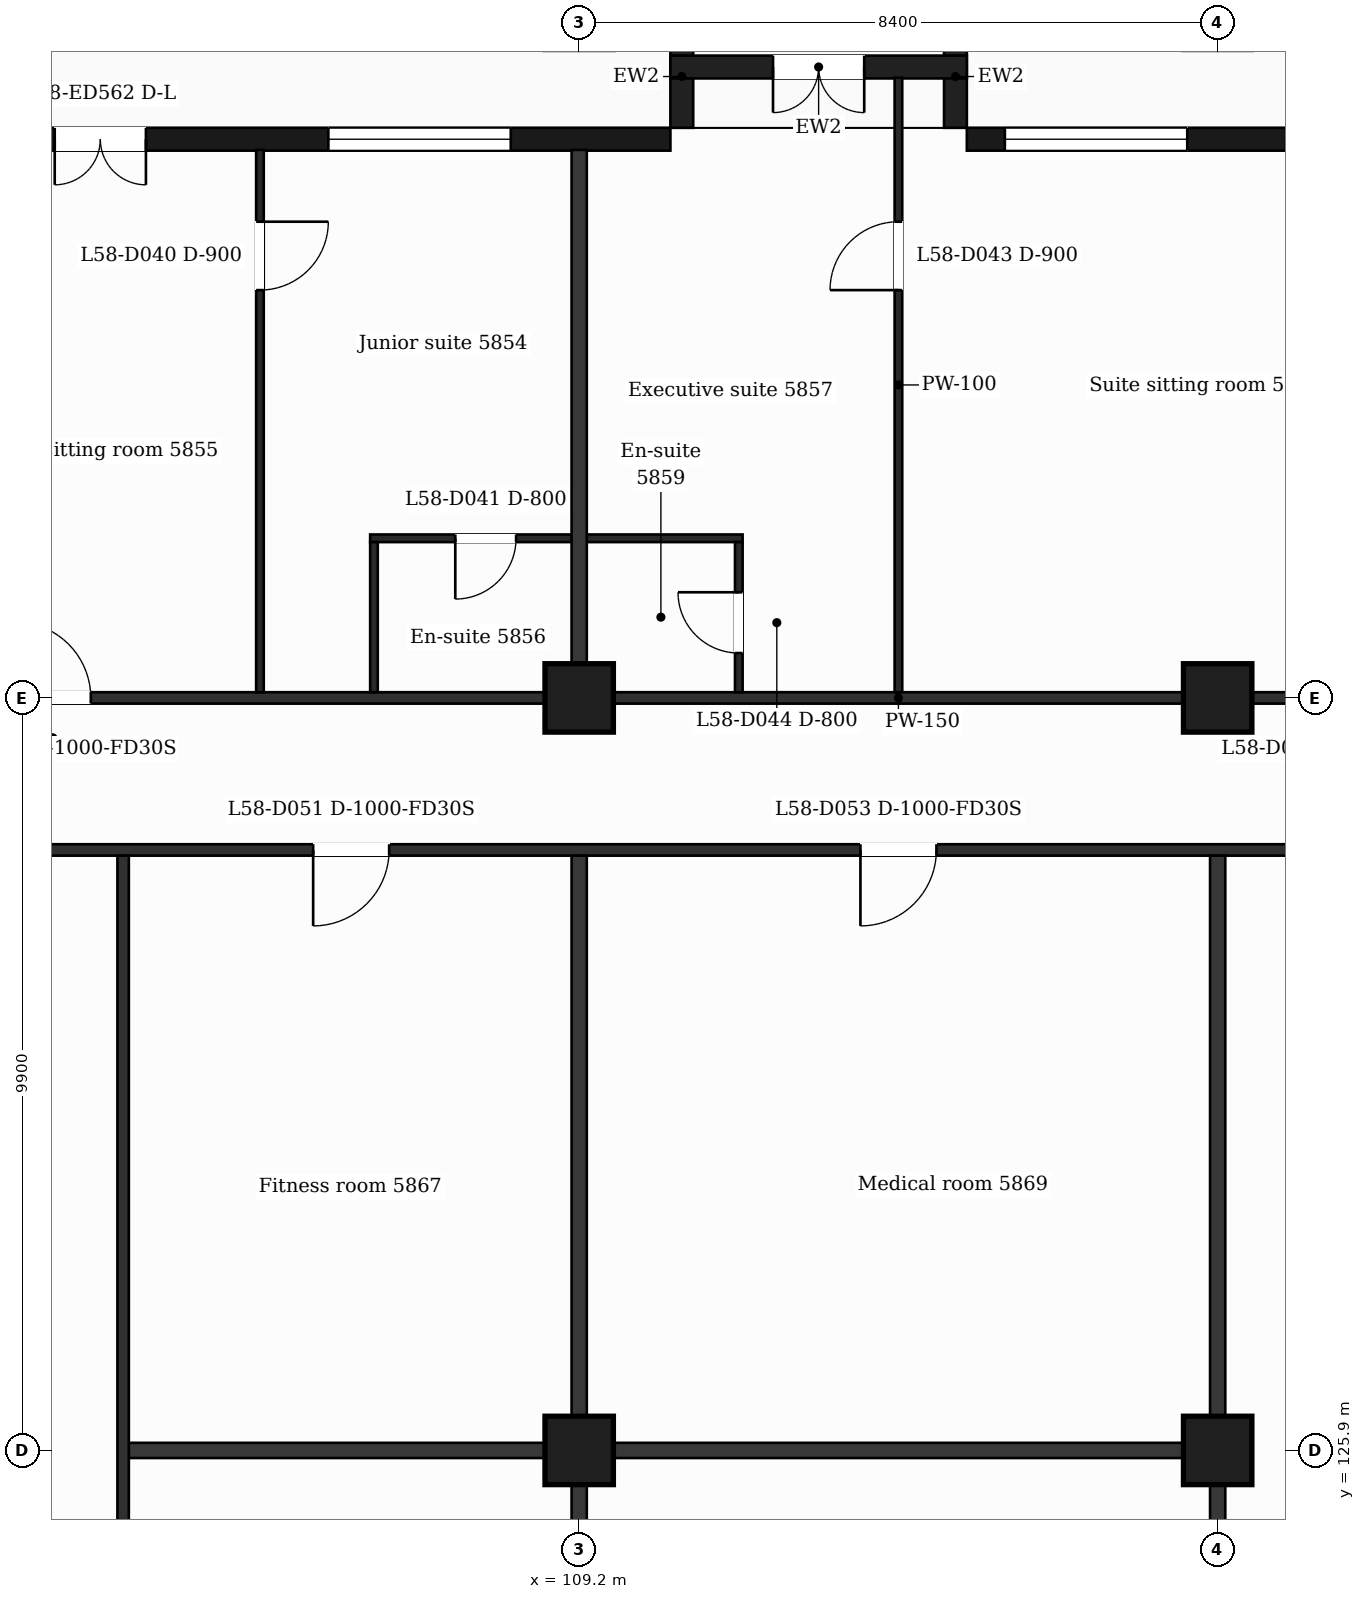
"""IFC4 building model, lengths in metres.
Left out: names, types, materials, properties, quantities, classifications, styles, units other than length and angle.
Written with IfcOpenShell. Run it as: python <this file> out.ifc"""

import sys

from ifc_helpers import new_model, si_unit, direction, frame, frame_2d, origin, origin_2d, place, context, subcontext, project, spatial, rectangle, extrude, element, fill, save


model = new_model("IFC4")
c1 = context("Model", 3, precision=1e-05, world=origin(), true_north=direction((0.0, 1.0)))
c2 = subcontext(c1, "Body", "Model", "MODEL_VIEW")
j1 = project(units=[si_unit("LENGTHUNIT", "METRE"), si_unit("PLANEANGLEUNIT", "RADIAN")], contexts=[c1])
p1 = place(None, origin())
s1 = spatial("IfcSite", under=j1, at=p1, CompositionType="ELEMENT")
p2 = place(p1, origin())
s2 = spatial("IfcBuilding", under=s1, at=p2, CompositionType="ELEMENT")
p3 = place(p2, frame((0.0, 0.0, 239.2)))
s3 = spatial("IfcBuildingStorey", under=s2, at=p3, CompositionType="ELEMENT", Elevation=239.2)
for number, where, z_axis, x_axis in (
    (1, (109.2, 125.9, 0.0), (0.0, 0.0, 1.0), (1.0, 0.0, 0.0)),
    (2, (117.6, 125.9, 0.0), (0.0, 0.0, 1.0), (1.0, 0.0, 0.0)),
    (3, (109.2, 135.8, 0.0), (0.0, 0.0, 1.0), (1.0, 0.0, 0.0)),
    (4, (117.6, 135.8, 0.0), (0.0, 0.0, 1.0), (1.0, 0.0, 0.0)),
):
    element("IfcColumn", number, at=place(p3, frame(where, z_axis=z_axis, x_axis=x_axis)), inside=s3, PredefinedType="COLUMN", context=c2, shape_type="SweptSolid", body=[
        extrude(rectangle(XDim=0.9, YDim=0.9, at=origin_2d()), origin(), (0.0, 0.0, 1.0), 3.7),
    ])
p4 = place(p3, frame((130.65, 143.15, 0.0), z_axis=(0.0, 0.0, 1.0), x_axis=(-1.0, 0.0, 0.0)))
e5 = element("IfcWall", 5, at=p4, inside=s3, PredefinedType="SOLIDWALL", context=c2, shape_type="SweptSolid", body=[
    extrude(rectangle(XDim=16.35, YDim=0.3, at=frame_2d((8.175, 0.0))), origin(), (0.0, 0.0, 1.0), 3.38),
])
p5 = place(p4, frame((1.95, 0.0, 0.9)))
e6 = element("IfcOpeningElement", 6, at=p5, cuts=e5, PredefinedType="OPENING", context=c2, shape_type="SweptSolid", body=[
    extrude(rectangle(XDim=1.2, YDim=2.1, at=frame_2d((0.6, 1.05))), frame((0.0, 0.16, 0.0), z_axis=(0.0, -1.0, 0.0), x_axis=(1.0, 0.0, 0.0)), (0.0, 0.0, 1.0), 0.32),
])
p6 = place(p4, frame((6.15, 0.0, 0.0)))
e7 = element("IfcOpeningElement", 7, at=p6, cuts=e5, PredefinedType="OPENING", context=c2, shape_type="SweptSolid", body=[
    extrude(rectangle(XDim=1.2, YDim=2.4, at=frame_2d((0.6, 1.2))), frame((0.0, 0.16, 0.0), z_axis=(0.0, -1.0, 0.0), x_axis=(1.0, 0.0, 0.0)), (0.0, 0.0, 1.0), 0.32),
])
p7 = place(p4, frame((9.75, 0.0, 0.9)))
e8 = element("IfcOpeningElement", 8, at=p7, cuts=e5, PredefinedType="OPENING", context=c2, shape_type="SweptSolid", body=[
    extrude(rectangle(XDim=2.4, YDim=2.1, at=frame_2d((1.2, 1.05))), frame((0.0, 0.16, 0.0), z_axis=(0.0, -1.0, 0.0), x_axis=(1.0, 0.0, 0.0)), (0.0, 0.0, 1.0), 0.32),
])
p8 = place(p4, frame((13.45, 0.0, 0.9)))
e9 = element("IfcOpeningElement", 9, at=p8, cuts=e5, PredefinedType="OPENING", context=c2, shape_type="SweptSolid", body=[
    extrude(rectangle(XDim=2.4, YDim=2.1, at=frame_2d((1.2, 1.05))), frame((0.0, 0.16, 0.0), z_axis=(0.0, -1.0, 0.0), x_axis=(1.0, 0.0, 0.0)), (0.0, 0.0, 1.0), 0.32),
])
p9 = place(p3, frame((110.4, 143.15, 0.0), z_axis=(0.0, 0.0, 1.0), x_axis=(-1.0, 0.0, 0.0)))
e10 = element("IfcWall", 10, at=p9, inside=s3, PredefinedType="SOLIDWALL", context=c2, shape_type="SweptSolid", body=[
    extrude(rectangle(XDim=14.4, YDim=0.3, at=frame_2d((7.2, 0.0))), origin(), (0.0, 0.0, 1.0), 3.38),
])
p10 = place(p9, frame((2.1, 0.0, 0.9)))
e11 = element("IfcOpeningElement", 11, at=p10, cuts=e10, PredefinedType="OPENING", context=c2, shape_type="SweptSolid", body=[
    extrude(rectangle(XDim=2.4, YDim=2.1, at=frame_2d((1.2, 1.05))), frame((0.0, 0.16, 0.0), z_axis=(0.0, -1.0, 0.0), x_axis=(1.0, 0.0, 0.0)), (0.0, 0.0, 1.0), 0.32),
])
p11 = place(p9, frame((6.9, 0.0, 0.0)))
e12 = element("IfcOpeningElement", 12, at=p11, cuts=e10, PredefinedType="OPENING", context=c2, shape_type="SweptSolid", body=[
    extrude(rectangle(XDim=1.2, YDim=2.4, at=frame_2d((0.6, 1.2))), frame((0.0, 0.16, 0.0), z_axis=(0.0, -1.0, 0.0), x_axis=(1.0, 0.0, 0.0)), (0.0, 0.0, 1.0), 0.32),
])
p12 = place(p9, frame((11.1, 0.0, 0.9)))
e13 = element("IfcOpeningElement", 13, at=p12, cuts=e10, PredefinedType="OPENING", context=c2, shape_type="SweptSolid", body=[
    extrude(rectangle(XDim=1.2, YDim=2.1, at=frame_2d((0.6, 1.05))), frame((0.0, 0.16, 0.0), z_axis=(0.0, -1.0, 0.0), x_axis=(1.0, 0.0, 0.0)), (0.0, 0.0, 1.0), 0.32),
])
for number, where, z_axis, x_axis in (
    (14, (114.15, 143.3, 0.0), (0.0, 0.0, 1.0), (0.0, 1.0, 0.0)),
    (15, (110.55, 143.3, 0.0), (0.0, 0.0, 1.0), (0.0, 1.0, 0.0)),
):
    element("IfcWall", number, at=place(p3, frame(where, z_axis=z_axis, x_axis=x_axis)), inside=s3, PredefinedType="SOLIDWALL", context=c2, shape_type="SweptSolid", body=[
        extrude(rectangle(XDim=1.35, YDim=0.3, at=frame_2d((0.675, 0.0))), origin(), (0.0, 0.0, 1.0), 3.38),
    ])
p13 = place(p3, frame((114.3, 144.1, 0.0), z_axis=(0.0, 0.0, 1.0), x_axis=(-1.0, 0.0, 0.0)))
e16 = element("IfcWall", 16, at=p13, inside=s3, PredefinedType="SOLIDWALL", context=c2, shape_type="SweptSolid", body=[
    extrude(rectangle(XDim=3.9, YDim=0.3, at=frame_2d((1.95, 0.0))), origin(), (0.0, 0.0, 1.0), 3.38),
])
p14 = place(p13, frame((1.35, 0.0, 0.0)))
e17 = element("IfcOpeningElement", 17, at=p14, cuts=e16, PredefinedType="OPENING", context=c2, shape_type="SweptSolid", body=[
    extrude(rectangle(XDim=1.2, YDim=2.4, at=frame_2d((0.6, 1.2))), frame((0.0, 0.16, 0.0), z_axis=(0.0, -1.0, 0.0), x_axis=(1.0, 0.0, 0.0)), (0.0, 0.0, 1.0), 0.32),
])
p15 = place(p3, frame((103.2, 125.9, 0.0), z_axis=(0.0, 0.0, 1.0), x_axis=(1.0, 0.0, 0.0)))
e18 = element("IfcWall", 18, at=p15, inside=s3, PredefinedType="PARTITIONING", context=c2, shape_type="SweptSolid", body=[
    extrude(rectangle(XDim=14.4, YDim=0.2, at=frame_2d((7.2, 0.0))), origin(), (0.0, 0.0, 1.0), 3.38),
])
p16 = place(p3, frame((100.725, 133.8, 0.0), z_axis=(0.0, 0.0, 1.0), x_axis=(1.0, 0.0, 0.0)))
e19 = element("IfcWall", 19, at=p16, inside=s3, PredefinedType="PARTITIONING", context=c2, shape_type="SweptSolid", body=[
    extrude(rectangle(XDim=25.35, YDim=0.15, at=frame_2d((12.675, 0.0))), origin(), (0.0, 0.0, 1.0), 3.38),
])
p17 = place(p16, frame((4.975, 0.0, 0.0)))
e20 = element("IfcOpeningElement", 20, at=p17, cuts=e19, PredefinedType="OPENING", context=c2, shape_type="SweptSolid", body=[
    extrude(rectangle(XDim=1.0, YDim=2.1, at=frame_2d((0.5, 1.05))), frame((0.0, 0.085, 0.0), z_axis=(0.0, -1.0, 0.0), x_axis=(1.0, 0.0, 0.0)), (0.0, 0.0, 1.0), 0.17),
])
p18 = place(p16, frame((12.175, 0.0, 0.0)))
e21 = element("IfcOpeningElement", 21, at=p18, cuts=e19, PredefinedType="OPENING", context=c2, shape_type="SweptSolid", body=[
    extrude(rectangle(XDim=1.0, YDim=2.1, at=frame_2d((0.5, 1.05))), frame((0.0, 0.085, 0.0), z_axis=(0.0, -1.0, 0.0), x_axis=(1.0, 0.0, 0.0)), (0.0, 0.0, 1.0), 0.17),
])
p19 = place(p16, frame((20.45, 0.0, 0.0)))
e22 = element("IfcOpeningElement", 22, at=p19, cuts=e19, PredefinedType="OPENING", context=c2, shape_type="SweptSolid", body=[
    extrude(rectangle(XDim=1.0, YDim=2.1, at=frame_2d((0.5, 1.05))), frame((0.0, 0.085, 0.0), z_axis=(0.0, -1.0, 0.0), x_axis=(1.0, 0.0, 0.0)), (0.0, 0.0, 1.0), 0.17),
])
p20 = place(p3, frame((90.895, 135.8, 0.0), z_axis=(0.0, 0.0, 1.0), x_axis=(1.0, 0.0, 0.0)))
e23 = element("IfcWall", 23, at=p20, inside=s3, PredefinedType="PARTITIONING", context=c2, shape_type="SweptSolid", body=[
    extrude(rectangle(XDim=45.011, YDim=0.15, at=frame_2d((22.505, 0.0))), origin(), (0.0, 0.0, 1.0), 3.38),
])
p21 = place(p20, frame((7.455, 0.0, 0.0)))
e24 = element("IfcOpeningElement", 24, at=p21, cuts=e23, PredefinedType="OPENING", context=c2, shape_type="SweptSolid", body=[
    extrude(rectangle(XDim=1.0, YDim=2.1, at=frame_2d((0.5, 1.05))), frame((0.0, 0.085, 0.0), z_axis=(0.0, -1.0, 0.0), x_axis=(1.0, 0.0, 0.0)), (0.0, 0.0, 1.0), 0.17),
])
p22 = place(p20, frame((10.88, 0.0, 0.0)))
e25 = element("IfcOpeningElement", 25, at=p22, cuts=e23, PredefinedType="OPENING", context=c2, shape_type="SweptSolid", body=[
    extrude(rectangle(XDim=1.0, YDim=2.1, at=frame_2d((0.5, 1.05))), frame((0.0, 0.085, 0.0), z_axis=(0.0, -1.0, 0.0), x_axis=(1.0, 0.0, 0.0)), (0.0, 0.0, 1.0), 0.17),
])
p23 = place(p20, frame((27.88, 0.0, 0.0)))
e26 = element("IfcOpeningElement", 26, at=p23, cuts=e23, PredefinedType="OPENING", context=c2, shape_type="SweptSolid", body=[
    extrude(rectangle(XDim=1.0, YDim=2.1, at=frame_2d((0.5, 1.05))), frame((0.0, 0.085, 0.0), z_axis=(0.0, -1.0, 0.0), x_axis=(1.0, 0.0, 0.0)), (0.0, 0.0, 1.0), 0.17),
])
p24 = place(p20, frame((33.168, 0.0, 0.0)))
e27 = element("IfcOpeningElement", 27, at=p24, cuts=e23, PredefinedType="OPENING", context=c2, shape_type="SweptSolid", body=[
    extrude(rectangle(XDim=0.95, YDim=2.1, at=frame_2d((0.475, 1.05))), frame((0.0, 0.085, 0.0), z_axis=(0.0, -1.0, 0.0), x_axis=(1.0, 0.0, 0.0)), (0.0, 0.0, 1.0), 0.17),
])
p25 = place(p20, frame((37.255, 0.0, 0.0)))
e28 = element("IfcOpeningElement", 28, at=p25, cuts=e23, PredefinedType="OPENING", context=c2, shape_type="SweptSolid", body=[
    extrude(rectangle(XDim=1.0, YDim=2.1, at=frame_2d((0.5, 1.05))), frame((0.0, 0.085, 0.0), z_axis=(0.0, -1.0, 0.0), x_axis=(1.0, 0.0, 0.0)), (0.0, 0.0, 1.0), 0.17),
])
p26 = place(p3, frame((106.45, 137.9, 0.0), z_axis=(0.0, 0.0, 1.0), x_axis=(1.0, 0.0, 0.0)))
e29 = element("IfcWall", 29, at=p26, inside=s3, PredefinedType="PARTITIONING", context=c2, shape_type="SweptSolid", body=[
    extrude(rectangle(XDim=4.9, YDim=0.1, at=frame_2d((2.45, 0.0))), origin(), (0.0, 0.0, 1.0), 3.38),
])
p27 = place(p26, frame((1.12, 0.0, 0.0)))
e30 = element("IfcOpeningElement", 30, at=p27, cuts=e29, PredefinedType="OPENING", context=c2, shape_type="SweptSolid", body=[
    extrude(rectangle(XDim=0.8, YDim=2.1, at=frame_2d((0.4, 1.05))), frame((0.0, 0.06, 0.0), z_axis=(0.0, -1.0, 0.0), x_axis=(1.0, 0.0, 0.0)), (0.0, 0.0, 1.0), 0.12),
])
p28 = place(p3, frame((103.2, 109.075, 0.0), z_axis=(0.0, 0.0, 1.0), x_axis=(0.0, 1.0, 0.0)))
e31 = element("IfcWall", 31, at=p28, inside=s3, PredefinedType="PARTITIONING", context=c2, shape_type="SweptSolid", body=[
    extrude(rectangle(XDim=24.65, YDim=0.15, at=frame_2d((12.325, 0.0))), origin(), (0.0, 0.0, 1.0), 3.38),
])
p29 = place(p3, frame((105.0, 135.875, 0.0), z_axis=(0.0, 0.0, 1.0), x_axis=(0.0, 1.0, 0.0)))
e32 = element("IfcWall", 32, at=p29, inside=s3, PredefinedType="PARTITIONING", context=c2, shape_type="SweptSolid", body=[
    extrude(rectangle(XDim=7.135, YDim=0.1, at=frame_2d((3.567, 0.0))), origin(), (0.0, 0.0, 1.0), 3.38),
])
p30 = place(p29, frame((5.29, 0.0, 0.0)))
e33 = element("IfcOpeningElement", 33, at=p30, cuts=e32, PredefinedType="OPENING", context=c2, shape_type="SweptSolid", body=[
    extrude(rectangle(XDim=0.9, YDim=2.1, at=frame_2d((0.45, 1.05))), frame((0.0, 0.06, 0.0), z_axis=(0.0, -1.0, 0.0), x_axis=(1.0, 0.0, 0.0)), (0.0, 0.0, 1.0), 0.12),
])
p31 = place(p3, frame((106.5, 135.875, 0.0), z_axis=(0.0, 0.0, 1.0), x_axis=(0.0, 1.0, 0.0)))
e34 = element("IfcWall", 34, at=p31, inside=s3, PredefinedType="PARTITIONING", context=c2, shape_type="SweptSolid", body=[
    extrude(rectangle(XDim=1.975, YDim=0.1, at=frame_2d((0.988, 0.0))), origin(), (0.0, 0.0, 1.0), 3.38),
])
p32 = place(p3, frame((109.2, 109.075, 0.0), z_axis=(0.0, 0.0, 1.0), x_axis=(0.0, 1.0, 0.0)))
e35 = element("IfcWall", 35, at=p32, inside=s3, PredefinedType="PARTITIONING", context=c2, shape_type="SweptSolid", body=[
    extrude(rectangle(XDim=24.65, YDim=0.2, at=frame_2d((12.325, 0.0))), origin(), (0.0, 0.0, 1.0), 3.38),
])
p33 = place(p3, frame((109.2, 135.875, 0.0), z_axis=(0.0, 0.0, 1.0), x_axis=(0.0, 1.0, 0.0)))
e36 = element("IfcWall", 36, at=p33, inside=s3, PredefinedType="PARTITIONING", context=c2, shape_type="SweptSolid", body=[
    extrude(rectangle(XDim=7.135, YDim=0.2, at=frame_2d((3.567, 0.0))), origin(), (0.0, 0.0, 1.0), 3.38),
])
p34 = place(p3, frame((111.3, 135.875, 0.0), z_axis=(0.0, 0.0, 1.0), x_axis=(0.0, 1.0, 0.0)))
e37 = element("IfcWall", 37, at=p34, inside=s3, PredefinedType="PARTITIONING", context=c2, shape_type="SweptSolid", body=[
    extrude(rectangle(XDim=1.975, YDim=0.1, at=frame_2d((0.988, 0.0))), origin(), (0.0, 0.0, 1.0), 3.38),
])
p35 = place(p34, frame((0.515, 0.0, 0.0)))
e38 = element("IfcOpeningElement", 38, at=p35, cuts=e37, PredefinedType="OPENING", context=c2, shape_type="SweptSolid", body=[
    extrude(rectangle(XDim=0.8, YDim=2.1, at=frame_2d((0.4, 1.05))), frame((0.0, 0.06, 0.0), z_axis=(0.0, -1.0, 0.0), x_axis=(1.0, 0.0, 0.0)), (0.0, 0.0, 1.0), 0.12),
])
p36 = place(p3, frame((113.4, 135.875, 0.0), z_axis=(0.0, 0.0, 1.0), x_axis=(0.0, 1.0, 0.0)))
e39 = element("IfcWall", 39, at=p36, inside=s3, PredefinedType="PARTITIONING", context=c2, shape_type="SweptSolid", body=[
    extrude(rectangle(XDim=8.085, YDim=0.1, at=frame_2d((4.042, 0.0))), origin(), (0.0, 0.0, 1.0), 3.38),
])
p37 = place(p36, frame((5.29, 0.0, 0.0)))
e40 = element("IfcOpeningElement", 40, at=p37, cuts=e39, PredefinedType="OPENING", context=c2, shape_type="SweptSolid", body=[
    extrude(rectangle(XDim=0.9, YDim=2.1, at=frame_2d((0.45, 1.05))), frame((0.0, 0.06, 0.0), z_axis=(0.0, -1.0, 0.0), x_axis=(1.0, 0.0, 0.0)), (0.0, 0.0, 1.0), 0.12),
])
p38 = place(p3, frame((117.6, 109.075, 0.0), z_axis=(0.0, 0.0, 1.0), x_axis=(0.0, 1.0, 0.0)))
e41 = element("IfcWall", 41, at=p38, inside=s3, PredefinedType="PARTITIONING", context=c2, shape_type="SweptSolid", body=[
    extrude(rectangle(XDim=24.65, YDim=0.2, at=frame_2d((12.325, 0.0))), origin(), (0.0, 0.0, 1.0), 3.38),
])
p39 = place(p8, origin())
e42 = element("IfcWindow", 42, at=p39, inside=s3, PartitioningType="SINGLE_PANEL", PredefinedType="WINDOW", context=c2, shape_type="SweptSolid", body=[
    extrude(rectangle(XDim=2.4, YDim=2.1, at=frame_2d((1.2, 1.05))), frame((0.0, 0.03, 0.0), z_axis=(0.0, -1.0, 0.0), x_axis=(1.0, 0.0, 0.0)), (0.0, 0.0, 1.0), 0.06),
])
fill(e9, e42)
p40 = place(p10, origin())
e43 = element("IfcWindow", 43, at=p40, inside=s3, PartitioningType="SINGLE_PANEL", PredefinedType="WINDOW", context=c2, shape_type="SweptSolid", body=[
    extrude(rectangle(XDim=2.4, YDim=2.1, at=frame_2d((1.2, 1.05))), frame((0.0, 0.03, 0.0), z_axis=(0.0, -1.0, 0.0), x_axis=(1.0, 0.0, 0.0)), (0.0, 0.0, 1.0), 0.06),
])
fill(e11, e43)
p41 = place(p11, origin())
e44 = element("IfcDoor", 44, at=p41, inside=s3, OperationType="DOUBLE_DOOR_SINGLE_SWING", PredefinedType="DOOR", context=c2, shape_type="SweptSolid", body=[
    extrude(rectangle(XDim=1.2, YDim=2.4, at=frame_2d((0.6, 1.2))), frame((0.0, 0.025, 0.0), z_axis=(0.0, -1.0, 0.0), x_axis=(1.0, 0.0, 0.0)), (0.0, 0.0, 1.0), 0.05),
])
fill(e12, e44)
p42 = place(p14, origin())
e45 = element("IfcDoor", 45, at=p42, inside=s3, OperationType="DOUBLE_DOOR_SINGLE_SWING", PredefinedType="DOOR", context=c2, shape_type="SweptSolid", body=[
    extrude(rectangle(XDim=1.2, YDim=2.4, at=frame_2d((0.6, 1.2))), frame((0.0, 0.025, 0.0), z_axis=(0.0, -1.0, 0.0), x_axis=(1.0, 0.0, 0.0)), (0.0, 0.0, 1.0), 0.05),
])
fill(e17, e45)
p43 = place(p22, origin())
e46 = element("IfcDoor", 46, at=p43, inside=s3, OperationType="SINGLE_SWING_LEFT", PredefinedType="DOOR", context=c2, shape_type="SweptSolid", body=[
    extrude(rectangle(XDim=1.0, YDim=2.1, at=frame_2d((0.5, 1.05))), frame((0.0, 0.025, 0.0), z_axis=(0.0, -1.0, 0.0), x_axis=(1.0, 0.0, 0.0)), (0.0, 0.0, 1.0), 0.05),
])
fill(e25, e46)
p44 = place(p30, origin())
e47 = element("IfcDoor", 47, at=p44, inside=s3, OperationType="SINGLE_SWING_RIGHT", PredefinedType="DOOR", context=c2, shape_type="SweptSolid", body=[
    extrude(rectangle(XDim=0.9, YDim=2.1, at=frame_2d((0.45, 1.05))), frame((0.0, 0.025, 0.0), z_axis=(0.0, -1.0, 0.0), x_axis=(1.0, 0.0, 0.0)), (0.0, 0.0, 1.0), 0.05),
])
fill(e33, e47)
p45 = place(p27, origin())
e48 = element("IfcDoor", 48, at=p45, inside=s3, OperationType="SINGLE_SWING_LEFT", PredefinedType="DOOR", context=c2, shape_type="SweptSolid", body=[
    extrude(rectangle(XDim=0.8, YDim=2.1, at=frame_2d((0.4, 1.05))), frame((0.0, 0.025, 0.0), z_axis=(0.0, -1.0, 0.0), x_axis=(1.0, 0.0, 0.0)), (0.0, 0.0, 1.0), 0.05),
])
fill(e30, e48)
p46 = place(p37, origin())
e49 = element("IfcDoor", 49, at=p46, inside=s3, OperationType="SINGLE_SWING_LEFT", PredefinedType="DOOR", context=c2, shape_type="SweptSolid", body=[
    extrude(rectangle(XDim=0.9, YDim=2.1, at=frame_2d((0.45, 1.05))), frame((0.0, 0.025, 0.0), z_axis=(0.0, -1.0, 0.0), x_axis=(1.0, 0.0, 0.0)), (0.0, 0.0, 1.0), 0.05),
])
fill(e40, e49)
p47 = place(p35, origin())
e50 = element("IfcDoor", 50, at=p47, inside=s3, OperationType="SINGLE_SWING_RIGHT", PredefinedType="DOOR", context=c2, shape_type="SweptSolid", body=[
    extrude(rectangle(XDim=0.8, YDim=2.1, at=frame_2d((0.4, 1.05))), frame((0.0, 0.025, 0.0), z_axis=(0.0, -1.0, 0.0), x_axis=(1.0, 0.0, 0.0)), (0.0, 0.0, 1.0), 0.05),
])
fill(e38, e50)
p48 = place(p17, origin())
e51 = element("IfcDoor", 51, at=p48, inside=s3, OperationType="SINGLE_SWING_LEFT", PredefinedType="DOOR", context=c2, shape_type="SweptSolid", body=[
    extrude(rectangle(XDim=1.0, YDim=2.1, at=frame_2d((0.5, 1.05))), frame((0.0, 0.025, 0.0), z_axis=(0.0, -1.0, 0.0), x_axis=(1.0, 0.0, 0.0)), (0.0, 0.0, 1.0), 0.05),
])
fill(e20, e51)
p49 = place(p18, origin())
e52 = element("IfcDoor", 52, at=p49, inside=s3, OperationType="SINGLE_SWING_LEFT", PredefinedType="DOOR", context=c2, shape_type="SweptSolid", body=[
    extrude(rectangle(XDim=1.0, YDim=2.1, at=frame_2d((0.5, 1.05))), frame((0.0, 0.025, 0.0), z_axis=(0.0, -1.0, 0.0), x_axis=(1.0, 0.0, 0.0)), (0.0, 0.0, 1.0), 0.05),
])
fill(e21, e52)
save(model, sys.argv[1])
